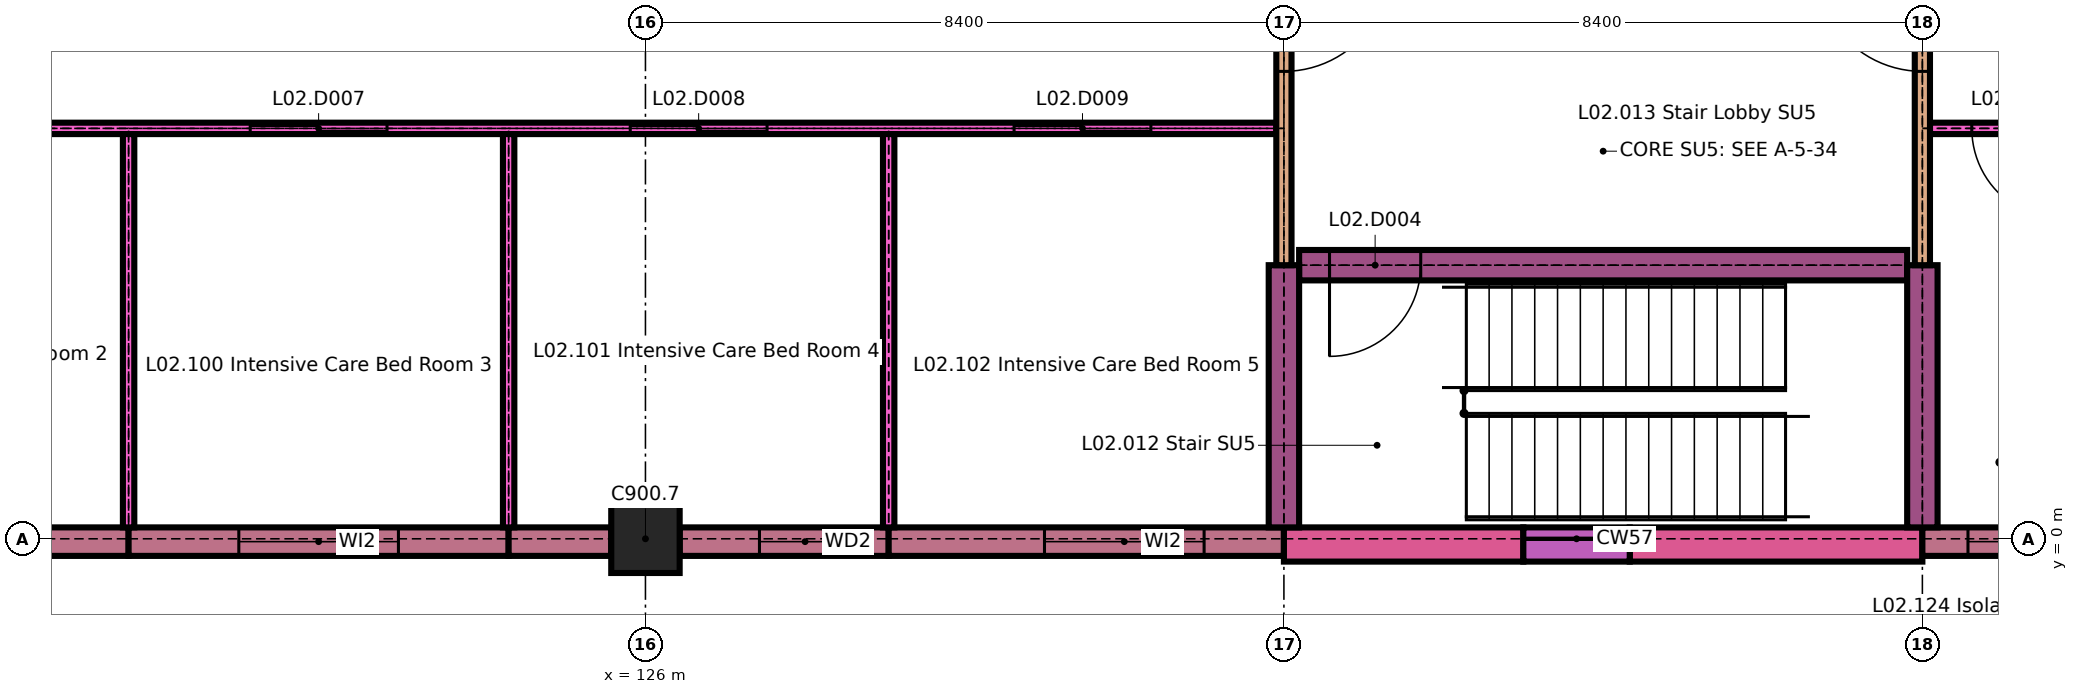
"""IFC4 building model, lengths in metres.
Left out: names, types, materials, properties, quantities, classifications, styles, units other than length and angle.
Written with IfcOpenShell. Run it as: python <this file> out.ifc"""

import sys

from ifc_helpers import new_model, si_unit, direction, frame, frame_2d, origin, origin_2d, place, context, subcontext, project, spatial, rectangle, extrude, element, fill, save


model = new_model("IFC4")
c1 = context("Model", 3, precision=1e-05, world=origin(), true_north=direction((0.0, 1.0)))
c2 = subcontext(c1, "Body", "Model", "MODEL_VIEW")
j1 = project(units=[si_unit("LENGTHUNIT", "METRE"), si_unit("PLANEANGLEUNIT", "RADIAN")], contexts=[c1])
p1 = place(None, origin())
s1 = spatial("IfcSite", under=j1, at=p1, CompositionType="ELEMENT")
p2 = place(p1, origin())
s2 = spatial("IfcBuilding", under=s1, at=p2, CompositionType="ELEMENT")
p3 = place(p2, frame((0.0, 0.0, 8.4)))
s3 = spatial("IfcBuildingStorey", under=s2, at=p3, CompositionType="ELEMENT", Elevation=8.4)
p4 = place(p3, frame((126.0, 0.0, 0.0), z_axis=(0.0, 0.0, 1.0), x_axis=(1.0, 0.0, 0.0)))
e1 = element("IfcColumn", 1, at=p4, inside=s3, PredefinedType="COLUMN", context=c2, shape_type="SweptSolid", body=[
    extrude(rectangle(XDim=0.9, YDim=0.9, at=origin_2d()), origin(), (0.0, 0.0, 1.0), 4.2),
])
p5 = place(p3, frame((118.05, -0.038, 0.0), z_axis=(0.0, 0.0, 1.0), x_axis=(1.0, 0.0, 0.0)))
e2 = element("IfcWall", 2, at=p5, inside=s3, PredefinedType="SOLIDWALL", context=c2, shape_type="SweptSolid", body=[
    extrude(rectangle(XDim=1.15, YDim=0.375, at=frame_2d((0.575, 0.0))), origin(), (0.0, 0.0, 1.0), 3.9),
])
p6 = place(p3, frame((119.2, -0.038, 0.0), z_axis=(0.0, 0.0, 1.0), x_axis=(1.0, 0.0, 0.0)))
e3 = element("IfcWall", 3, at=p6, inside=s3, PredefinedType="SOLIDWALL", context=c2, shape_type="SweptSolid", body=[
    extrude(rectangle(XDim=5.0, YDim=0.375, at=frame_2d((2.5, 0.0))), origin(), (0.0, 0.0, 1.0), 3.9),
])
p7 = place(p6, frame((1.45, 0.0, 0.9)))
e4 = element("IfcOpeningElement", 4, at=p7, cuts=e3, PredefinedType="OPENING", context=c2, shape_type="SweptSolid", body=[
    extrude(rectangle(XDim=2.1, YDim=2.1, at=frame_2d((1.05, 1.05))), frame((0.0, 0.198, 0.0), z_axis=(0.0, -1.0, 0.0), x_axis=(1.0, 0.0, 0.0)), (0.0, 0.0, 1.0), 0.395),
])
p8 = place(p3, frame((124.2, -0.038, 0.0), z_axis=(0.0, 0.0, 1.0), x_axis=(1.0, 0.0, 0.0)))
e5 = element("IfcWall", 5, at=p8, inside=s3, PredefinedType="SOLIDWALL", context=c2, shape_type="SweptSolid", body=[
    extrude(rectangle(XDim=1.35, YDim=0.375, at=frame_2d((0.675, 0.0))), origin(), (0.0, 0.0, 1.0), 3.9),
])
p9 = place(p3, frame((126.45, -0.038, 0.0), z_axis=(0.0, 0.0, 1.0), x_axis=(1.0, 0.0, 0.0)))
e6 = element("IfcWall", 6, at=p9, inside=s3, PredefinedType="SOLIDWALL", context=c2, shape_type="SweptSolid", body=[
    extrude(rectangle(XDim=2.75, YDim=0.375, at=frame_2d((1.375, 0.0))), origin(), (0.0, 0.0, 1.0), 3.9),
])
p10 = place(p9, frame((1.05, 0.0, 0.9)))
e7 = element("IfcOpeningElement", 7, at=p10, cuts=e6, PredefinedType="OPENING", context=c2, shape_type="SweptSolid", body=[
    extrude(rectangle(XDim=1.2, YDim=2.1, at=frame_2d((0.6, 1.05))), frame((0.0, 0.198, 0.0), z_axis=(0.0, -1.0, 0.0), x_axis=(1.0, 0.0, 0.0)), (0.0, 0.0, 1.0), 0.395),
])
p11 = place(p3, frame((129.2, -0.038, 0.0), z_axis=(0.0, 0.0, 1.0), x_axis=(1.0, 0.0, 0.0)))
e8 = element("IfcWall", 8, at=p11, inside=s3, PredefinedType="SOLIDWALL", context=c2, shape_type="SweptSolid", body=[
    extrude(rectangle(XDim=5.2, YDim=0.375, at=frame_2d((2.6, 0.0))), origin(), (0.0, 0.0, 1.0), 3.9),
])
p12 = place(p11, frame((2.05, 0.0, 0.9)))
e9 = element("IfcOpeningElement", 9, at=p12, cuts=e8, PredefinedType="OPENING", context=c2, shape_type="SweptSolid", body=[
    extrude(rectangle(XDim=2.1, YDim=2.1, at=frame_2d((1.05, 1.05))), frame((0.0, 0.198, 0.0), z_axis=(0.0, -1.0, 0.0), x_axis=(1.0, 0.0, 0.0)), (0.0, 0.0, 1.0), 0.395),
])
p13 = place(p3, frame((134.4, -0.075, 0.0), z_axis=(0.0, 0.0, 1.0), x_axis=(1.0, 0.0, 0.0)))
e10 = element("IfcWall", 10, at=p13, inside=s3, PredefinedType="SOLIDWALL", context=c2, shape_type="SweptSolid", body=[
    extrude(rectangle(XDim=3.15, YDim=0.45, at=frame_2d((1.575, 0.0))), origin(), (0.0, 0.0, 1.0), 4.2),
])
p14 = place(p3, frame((138.95, -0.075, 0.0), z_axis=(0.0, 0.0, 1.0), x_axis=(1.0, 0.0, 0.0)))
e11 = element("IfcWall", 11, at=p14, inside=s3, PredefinedType="SOLIDWALL", context=c2, shape_type="SweptSolid", body=[
    extrude(rectangle(XDim=3.85, YDim=0.45, at=frame_2d((1.925, 0.0))), origin(), (0.0, 0.0, 1.0), 4.2),
])
p15 = place(p3, frame((137.55, -0.075, 0.0), z_axis=(0.0, 0.0, 1.0), x_axis=(1.0, 0.0, 0.0)))
e12 = element("IfcWall", 12, at=p15, inside=s3, PredefinedType="SOLIDWALL", context=c2, shape_type="SweptSolid", body=[
    extrude(rectangle(XDim=1.4, YDim=0.45, at=frame_2d((0.7, 0.0))), origin(), (0.0, 0.0, 1.0), 0.6),
])
p16 = place(p3, frame((142.8, -0.038, 0.0), z_axis=(0.0, 0.0, 1.0), x_axis=(1.0, 0.0, 0.0)))
e13 = element("IfcWall", 13, at=p16, inside=s3, PredefinedType="SOLIDWALL", context=c2, shape_type="SweptSolid", body=[
    extrude(rectangle(XDim=2.4, YDim=0.375, at=frame_2d((1.2, 0.0))), origin(), (0.0, 0.0, 1.0), 3.9),
])
p17 = place(p16, frame((0.6, 0.0, 0.9)))
e14 = element("IfcOpeningElement", 14, at=p17, cuts=e13, PredefinedType="OPENING", context=c2, shape_type="SweptSolid", body=[
    extrude(rectangle(XDim=1.2, YDim=2.1, at=frame_2d((0.6, 1.05))), frame((0.0, 0.198, 0.0), z_axis=(0.0, -1.0, 0.0), x_axis=(1.0, 0.0, 0.0)), (0.0, 0.0, 1.0), 0.395),
])
p18 = place(p3, frame((134.6, 3.6, 0.0), z_axis=(0.0, 0.0, 1.0), x_axis=(1.0, 0.0, 0.0)))
e15 = element("IfcWall", 15, at=p18, inside=s3, PredefinedType="SHEAR", context=c2, shape_type="SweptSolid", body=[
    extrude(rectangle(XDim=8.0, YDim=0.4, at=frame_2d((4.0, 0.0))), origin(), (0.0, 0.0, 1.0), 4.2),
])
p19 = place(p18, frame((0.4, 0.0, 0.0)))
e16 = element("IfcOpeningElement", 16, at=p19, cuts=e15, PredefinedType="OPENING", context=c2, shape_type="SweptSolid", body=[
    extrude(rectangle(XDim=1.2, YDim=2.1, at=frame_2d((0.6, 1.05))), frame((0.0, 0.21, 0.0), z_axis=(0.0, -1.0, 0.0), x_axis=(1.0, 0.0, 0.0)), (0.0, 0.0, 1.0), 0.42),
])
p20 = place(p3, frame((109.3, 5.4, 0.0), z_axis=(0.0, 0.0, 1.0), x_axis=(1.0, 0.0, 0.0)))
e17 = element("IfcWall", 17, at=p20, inside=s3, PredefinedType="PARTITIONING", context=c2, shape_type="SweptSolid", body=[
    extrude(rectangle(XDim=25.0, YDim=0.15, at=frame_2d((12.5, 0.0))), origin(), (0.0, 0.0, 1.0), 4.2),
])
p21 = place(p20, frame((1.55, 0.0, 0.0)))
e18 = element("IfcOpeningElement", 18, at=p21, cuts=e17, PredefinedType="OPENING", context=c2, shape_type="SweptSolid", body=[
    extrude(rectangle(XDim=1.8, YDim=2.4, at=frame_2d((0.9, 1.2))), frame((0.0, 0.085, 0.0), z_axis=(0.0, -1.0, 0.0), x_axis=(1.0, 0.0, 0.0)), (0.0, 0.0, 1.0), 0.17),
])
p22 = place(p20, frame((6.5, 0.0, 0.0)))
e19 = element("IfcOpeningElement", 19, at=p22, cuts=e17, PredefinedType="OPENING", context=c2, shape_type="SweptSolid", body=[
    extrude(rectangle(XDim=1.8, YDim=2.4, at=frame_2d((0.9, 1.2))), frame((0.0, 0.085, 0.0), z_axis=(0.0, -1.0, 0.0), x_axis=(1.0, 0.0, 0.0)), (0.0, 0.0, 1.0), 0.17),
])
p23 = place(p20, frame((11.5, 0.0, 0.0)))
e20 = element("IfcOpeningElement", 20, at=p23, cuts=e17, PredefinedType="OPENING", context=c2, shape_type="SweptSolid", body=[
    extrude(rectangle(XDim=1.8, YDim=2.4, at=frame_2d((0.9, 1.2))), frame((0.0, 0.085, 0.0), z_axis=(0.0, -1.0, 0.0), x_axis=(1.0, 0.0, 0.0)), (0.0, 0.0, 1.0), 0.17),
])
p24 = place(p20, frame((16.5, 0.0, 0.0)))
e21 = element("IfcOpeningElement", 21, at=p24, cuts=e17, PredefinedType="OPENING", context=c2, shape_type="SweptSolid", body=[
    extrude(rectangle(XDim=1.8, YDim=2.4, at=frame_2d((0.9, 1.2))), frame((0.0, 0.085, 0.0), z_axis=(0.0, -1.0, 0.0), x_axis=(1.0, 0.0, 0.0)), (0.0, 0.0, 1.0), 0.17),
])
p25 = place(p20, frame((21.55, 0.0, 0.0)))
e22 = element("IfcOpeningElement", 22, at=p25, cuts=e17, PredefinedType="OPENING", context=c2, shape_type="SweptSolid", body=[
    extrude(rectangle(XDim=1.8, YDim=2.4, at=frame_2d((0.9, 1.2))), frame((0.0, 0.085, 0.0), z_axis=(0.0, -1.0, 0.0), x_axis=(1.0, 0.0, 0.0)), (0.0, 0.0, 1.0), 0.17),
])
p26 = place(p3, frame((142.9, 5.4, 0.0), z_axis=(0.0, 0.0, 1.0), x_axis=(1.0, 0.0, 0.0)))
e23 = element("IfcWall", 23, at=p26, inside=s3, PredefinedType="PARTITIONING", context=c2, shape_type="SweptSolid", body=[
    extrude(rectangle(XDim=24.95, YDim=0.15, at=frame_2d((12.475, 0.0))), origin(), (0.0, 0.0, 1.0), 4.2),
])
p27 = place(p26, frame((0.55, 0.0, 0.0)))
e24 = element("IfcOpeningElement", 24, at=p27, cuts=e23, PredefinedType="OPENING", context=c2, shape_type="SweptSolid", body=[
    extrude(rectangle(XDim=1.2, YDim=2.1, at=frame_2d((0.6, 1.05))), frame((0.0, 0.085, 0.0), z_axis=(0.0, -1.0, 0.0), x_axis=(1.0, 0.0, 0.0)), (0.0, 0.0, 1.0), 0.17),
])
p28 = place(p26, frame((7.7, 0.0, 0.0)))
e25 = element("IfcOpeningElement", 25, at=p28, cuts=e23, PredefinedType="OPENING", context=c2, shape_type="SweptSolid", body=[
    extrude(rectangle(XDim=1.2, YDim=2.1, at=frame_2d((0.6, 1.05))), frame((0.0, 0.085, 0.0), z_axis=(0.0, -1.0, 0.0), x_axis=(1.0, 0.0, 0.0)), (0.0, 0.0, 1.0), 0.17),
])
p29 = place(p26, frame((16.1, 0.0, 0.0)))
e26 = element("IfcOpeningElement", 26, at=p29, cuts=e23, PredefinedType="OPENING", context=c2, shape_type="SweptSolid", body=[
    extrude(rectangle(XDim=1.8, YDim=2.4, at=frame_2d((0.9, 1.2))), frame((0.0, 0.085, 0.0), z_axis=(0.0, -1.0, 0.0), x_axis=(1.0, 0.0, 0.0)), (0.0, 0.0, 1.0), 0.17),
])
p30 = place(p26, frame((21.425, 0.0, 0.0)))
e27 = element("IfcOpeningElement", 27, at=p30, cuts=e23, PredefinedType="OPENING", context=c2, shape_type="SweptSolid", body=[
    extrude(rectangle(XDim=1.8, YDim=2.4, at=frame_2d((0.9, 1.2))), frame((0.0, 0.085, 0.0), z_axis=(0.0, -1.0, 0.0), x_axis=(1.0, 0.0, 0.0)), (0.0, 0.0, 1.0), 0.17),
])
for number, where, z_axis, x_axis in (
    (28, (119.2, 0.15, 0.0), (0.0, 0.0, 1.0), (0.0, 1.0, 0.0)),
    (29, (124.2, 0.15, 0.0), (0.0, 0.0, 1.0), (0.0, 1.0, 0.0)),
    (30, (129.2, 0.15, 0.0), (0.0, 0.0, 1.0), (0.0, 1.0, 0.0)),
):
    element("IfcWall", number, at=place(p3, frame(where, z_axis=z_axis, x_axis=x_axis)), inside=s3, PredefinedType="PARTITIONING", context=c2, shape_type="SweptSolid", body=[
        extrude(rectangle(XDim=5.175, YDim=0.15, at=frame_2d((2.587, 0.0))), origin(), (0.0, 0.0, 1.0), 4.2),
    ])
p31 = place(p3, frame((134.4, 0.15, 0.0), z_axis=(0.0, 0.0, 1.0), x_axis=(0.0, 1.0, 0.0)))
e31 = element("IfcWall", 31, at=p31, inside=s3, PredefinedType="SHEAR", context=c2, shape_type="SweptSolid", body=[
    extrude(rectangle(XDim=3.45, YDim=0.4, at=frame_2d((1.725, 0.0))), origin(), (0.0, 0.0, 1.0), 4.2),
])
p32 = place(p3, frame((134.4, 3.6, 0.0), z_axis=(0.0, 0.0, 1.0), x_axis=(0.0, 1.0, 0.0)))
e32 = element("IfcWall", 32, at=p32, inside=s3, PredefinedType="PARTITIONING", context=c2, shape_type="SweptSolid", body=[
    extrude(rectangle(XDim=4.7, YDim=0.2, at=frame_2d((2.35, 0.0))), origin(), (0.0, 0.0, 1.0), 4.2),
])
p33 = place(p32, frame((2.55, 0.0, 0.0)))
e33 = element("IfcOpeningElement", 33, at=p33, cuts=e32, PredefinedType="OPENING", context=c2, shape_type="SweptSolid", body=[
    extrude(rectangle(XDim=1.4, YDim=2.1, at=frame_2d((0.7, 1.05))), frame((0.0, 0.11, 0.0), z_axis=(0.0, -1.0, 0.0), x_axis=(1.0, 0.0, 0.0)), (0.0, 0.0, 1.0), 0.22),
])
p34 = place(p3, frame((142.8, 0.15, 0.0), z_axis=(0.0, 0.0, 1.0), x_axis=(0.0, 1.0, 0.0)))
e34 = element("IfcWall", 34, at=p34, inside=s3, PredefinedType="SHEAR", context=c2, shape_type="SweptSolid", body=[
    extrude(rectangle(XDim=3.45, YDim=0.4, at=frame_2d((1.725, 0.0))), origin(), (0.0, 0.0, 1.0), 4.2),
])
p35 = place(p3, frame((142.8, 3.6, 0.0), z_axis=(0.0, 0.0, 1.0), x_axis=(0.0, 1.0, 0.0)))
e35 = element("IfcWall", 35, at=p35, inside=s3, PredefinedType="PARTITIONING", context=c2, shape_type="SweptSolid", body=[
    extrude(rectangle(XDim=4.7, YDim=0.2, at=frame_2d((2.35, 0.0))), origin(), (0.0, 0.0, 1.0), 4.2),
])
p36 = place(p35, frame((2.55, 0.0, 0.0)))
e36 = element("IfcOpeningElement", 36, at=p36, cuts=e35, PredefinedType="OPENING", context=c2, shape_type="SweptSolid", body=[
    extrude(rectangle(XDim=1.4, YDim=2.1, at=frame_2d((0.7, 1.05))), frame((0.0, 0.11, 0.0), z_axis=(0.0, -1.0, 0.0), x_axis=(1.0, 0.0, 0.0)), (0.0, 0.0, 1.0), 0.22),
])
p37 = place(p7, origin())
e37 = element("IfcWindow", 37, at=p37, inside=s3, PartitioningType="SINGLE_PANEL", PredefinedType="WINDOW", context=c2, shape_type="SweptSolid", body=[
    extrude(rectangle(XDim=2.1, YDim=2.1, at=frame_2d((1.05, 1.05))), frame((0.0, 0.045, 0.0), z_axis=(0.0, -1.0, 0.0), x_axis=(1.0, 0.0, 0.0)), (0.0, 0.0, 1.0), 0.09),
])
fill(e4, e37)
p38 = place(p10, origin())
e38 = element("IfcWindow", 38, at=p38, inside=s3, PartitioningType="SINGLE_PANEL", PredefinedType="WINDOW", context=c2, shape_type="SweptSolid", body=[
    extrude(rectangle(XDim=1.2, YDim=2.1, at=frame_2d((0.6, 1.05))), frame((0.0, 0.03, 0.0), z_axis=(0.0, -1.0, 0.0), x_axis=(1.0, 0.0, 0.0)), (0.0, 0.0, 1.0), 0.06),
])
fill(e7, e38)
p39 = place(p12, origin())
e39 = element("IfcWindow", 39, at=p39, inside=s3, PartitioningType="SINGLE_PANEL", PredefinedType="WINDOW", context=c2, shape_type="SweptSolid", body=[
    extrude(rectangle(XDim=2.1, YDim=2.1, at=frame_2d((1.05, 1.05))), frame((0.0, 0.045, 0.0), z_axis=(0.0, -1.0, 0.0), x_axis=(1.0, 0.0, 0.0)), (0.0, 0.0, 1.0), 0.09),
])
fill(e9, e39)
p40 = place(p17, origin())
e40 = element("IfcWindow", 40, at=p40, inside=s3, PartitioningType="SINGLE_PANEL", PredefinedType="WINDOW", context=c2, shape_type="SweptSolid", body=[
    extrude(rectangle(XDim=1.2, YDim=2.1, at=frame_2d((0.6, 1.05))), frame((0.0, 0.03, 0.0), z_axis=(0.0, -1.0, 0.0), x_axis=(1.0, 0.0, 0.0)), (0.0, 0.0, 1.0), 0.06),
])
fill(e14, e40)
p41 = place(p19, origin())
e41 = element("IfcDoor", 41, at=p41, inside=s3, OperationType="SINGLE_SWING_LEFT", PredefinedType="DOOR", context=c2, shape_type="SweptSolid", body=[
    extrude(rectangle(XDim=1.2, YDim=2.1, at=frame_2d((0.6, 1.05))), frame((0.0, 0.025, 0.0), z_axis=(0.0, -1.0, 0.0), x_axis=(1.0, 0.0, 0.0)), (0.0, 0.0, 1.0), 0.05),
])
fill(e16, e41)
p42 = place(p23, origin())
e42 = element("IfcDoor", 42, at=p42, inside=s3, OperationType="DOUBLE_DOOR_SLIDING", PredefinedType="DOOR", context=c2, shape_type="SweptSolid", body=[
    extrude(rectangle(XDim=1.8, YDim=2.4, at=frame_2d((0.9, 1.2))), frame((0.0, 0.035, 0.0), z_axis=(0.0, -1.0, 0.0), x_axis=(1.0, 0.0, 0.0)), (0.0, 0.0, 1.0), 0.07),
])
fill(e20, e42)
p43 = place(p24, origin())
e43 = element("IfcDoor", 43, at=p43, inside=s3, OperationType="DOUBLE_DOOR_SLIDING", PredefinedType="DOOR", context=c2, shape_type="SweptSolid", body=[
    extrude(rectangle(XDim=1.8, YDim=2.4, at=frame_2d((0.9, 1.2))), frame((0.0, 0.035, 0.0), z_axis=(0.0, -1.0, 0.0), x_axis=(1.0, 0.0, 0.0)), (0.0, 0.0, 1.0), 0.07),
])
fill(e21, e43)
p44 = place(p25, origin())
e44 = element("IfcDoor", 44, at=p44, inside=s3, OperationType="DOUBLE_DOOR_SLIDING", PredefinedType="DOOR", context=c2, shape_type="SweptSolid", body=[
    extrude(rectangle(XDim=1.8, YDim=2.4, at=frame_2d((0.9, 1.2))), frame((0.0, 0.035, 0.0), z_axis=(0.0, -1.0, 0.0), x_axis=(1.0, 0.0, 0.0)), (0.0, 0.0, 1.0), 0.07),
])
fill(e22, e44)
p45 = place(p27, origin())
e45 = element("IfcDoor", 45, at=p45, inside=s3, OperationType="SINGLE_SWING_RIGHT", PredefinedType="DOOR", context=c2, shape_type="SweptSolid", body=[
    extrude(rectangle(XDim=1.2, YDim=2.1, at=frame_2d((0.6, 1.05))), frame((0.0, 0.05, 0.0), z_axis=(0.0, -1.0, 0.0), x_axis=(1.0, 0.0, 0.0)), (0.0, 0.0, 1.0), 0.1),
])
fill(e24, e45)
p46 = place(p33, origin())
e46 = element("IfcDoor", 46, at=p46, inside=s3, OperationType="SINGLE_SWING_RIGHT", PredefinedType="DOOR", context=c2, shape_type="SweptSolid", body=[
    extrude(rectangle(XDim=1.4, YDim=2.1, at=frame_2d((0.7, 1.05))), frame((0.0, 0.03, 0.0), z_axis=(0.0, -1.0, 0.0), x_axis=(1.0, 0.0, 0.0)), (0.0, 0.0, 1.0), 0.06),
])
fill(e33, e46)
p47 = place(p36, origin())
e47 = element("IfcDoor", 47, at=p47, inside=s3, OperationType="SINGLE_SWING_LEFT", PredefinedType="DOOR", context=c2, shape_type="SweptSolid", body=[
    extrude(rectangle(XDim=1.4, YDim=2.1, at=frame_2d((0.7, 1.05))), frame((0.0, 0.03, 0.0), z_axis=(0.0, -1.0, 0.0), x_axis=(1.0, 0.0, 0.0)), (0.0, 0.0, 1.0), 0.06),
])
fill(e36, e47)
save(model, sys.argv[1])
